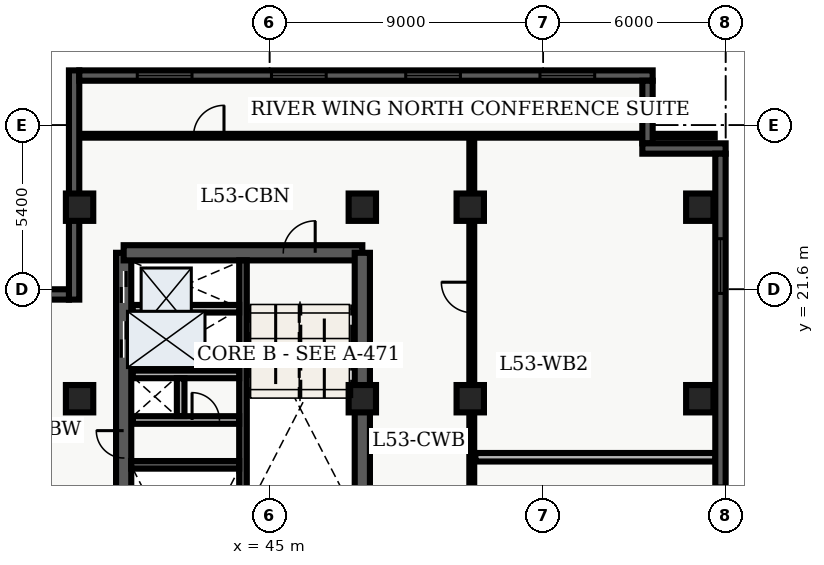
"""IFC4 building model, lengths in metres.
Left out: names, types, materials, properties, quantities, classifications, styles, units other than length and angle.
Written with IfcOpenShell. Run it as: python <this file> out.ifc"""

import sys

from ifc_helpers import new_model, entity, si_unit, converted_unit, direction, frame, origin_with_axes, origin_2d_with_axis, place, context, subcontext, project, spatial, polyline, rectangle, outline, extrude, element, fill, save


model = new_model("IFC4")
c1 = context("Model", 3, precision=1e-05, world=origin_with_axes(), true_north=direction((0.0, 1.0)))
c2 = subcontext(c1, "Body", "Model", "MODEL_VIEW")
j1 = project(units=[si_unit("LENGTHUNIT", "METRE"), converted_unit("PLANEANGLEUNIT", "DEGREE", entity("IfcPlaneAngleMeasure", 0.017), si_unit("PLANEANGLEUNIT", "RADIAN"), dimensions=[0, 0, 0, 0, 0, 0, 0])], contexts=[c1])
p1 = place(None, origin_with_axes())
s1 = spatial("IfcSite", under=j1, at=p1, CompositionType="ELEMENT")
p2 = place(p1, origin_with_axes())
s2 = spatial("IfcBuilding", under=s1, at=p2, CompositionType="ELEMENT")
p3 = place(p2, frame((0.0, 0.0, 216.0), z_axis=(0.0, 0.0, 1.0), x_axis=(1.0, 0.0, 0.0)))
s3 = spatial("IfcBuildingStorey", under=s2, at=p3, CompositionType="ELEMENT", Elevation=216.0)
p4 = place(p3, frame((40.2, 7.2, 0.0), z_axis=(0.0, 0.0, 1.0), x_axis=(0.0, 1.0, 0.0)))
e1 = element("IfcWall", 1, at=p4, inside=s3, PredefinedType="SHEAR", context=c2, shape_type="SweptSolid", body=[
    extrude(outline(polyline([(0.0, -0.25), (15.6, -0.25), (15.6, 0.25), (0.0, 0.25), (0.0, -0.25)])), origin_with_axes(), (0.0, 0.0, 1.0), 3.6),
])
p5 = place(p4, frame((14.475, 0.0, 0.0), z_axis=(0.0, 0.0, 1.0), x_axis=(1.0, 0.0, 0.0)))
e2 = element("IfcOpeningElement", 2, at=p5, cuts=e1, PredefinedType="OPENING", context=c2, shape_type="SweptSolid", body=[
    extrude(rectangle(XDim=1.05, YDim=0.52, at=origin_2d_with_axis()), origin_with_axes(), (0.0, 0.0, 1.0), 2.15),
])
p6 = place(p4, frame((12.75, 0.0, 0.0), z_axis=(0.0, 0.0, 1.0), x_axis=(1.0, 0.0, 0.0)))
e3 = element("IfcOpeningElement", 3, at=p6, cuts=e1, PredefinedType="OPENING", context=c2, shape_type="SweptSolid", body=[
    extrude(rectangle(XDim=1.2, YDim=0.52, at=origin_2d_with_axis()), origin_with_axes(), (0.0, 0.0, 1.0), 2.15),
])
p7 = place(p4, frame((9.3, 0.0, 0.0), z_axis=(0.0, 0.0, 1.0), x_axis=(1.0, 0.0, 0.0)))
e4 = element("IfcOpeningElement", 4, at=p7, cuts=e1, PredefinedType="OPENING", context=c2, shape_type="SweptSolid", body=[
    extrude(rectangle(XDim=0.9, YDim=0.52, at=origin_2d_with_axis()), origin_with_axes(), (0.0, 0.0, 1.0), 2.15),
])
p8 = place(p3, frame((40.2, 22.8, 0.0), z_axis=(0.0, 0.0, 1.0), x_axis=(1.0, 0.0, 0.0)))
e5 = element("IfcWall", 5, at=p8, inside=s3, PredefinedType="SHEAR", context=c2, shape_type="SweptSolid", body=[
    extrude(outline(polyline([(0.0, -0.25), (7.85, -0.25), (7.85, 0.25), (0.0, 0.25), (0.0, -0.25)])), origin_with_axes(), (0.0, 0.0, 1.0), 3.6),
])
p9 = place(p8, frame((5.775, 0.0, 0.0), z_axis=(0.0, 0.0, 1.0), x_axis=(1.0, 0.0, 0.0)))
e6 = element("IfcOpeningElement", 6, at=p9, cuts=e5, PredefinedType="OPENING", context=c2, shape_type="SweptSolid", body=[
    extrude(rectangle(XDim=1.05, YDim=0.52, at=origin_2d_with_axis()), origin_with_axes(), (0.0, 0.0, 1.0), 2.15),
])
p10 = place(p3, frame((48.05, 7.2, 0.0), z_axis=(0.0, 0.0, 1.0), x_axis=(0.0, 1.0, 0.0)))
e7 = element("IfcWall", 7, at=p10, inside=s3, PredefinedType="SHEAR", context=c2, shape_type="SweptSolid", body=[
    extrude(outline(polyline([(0.0, -0.25), (15.6, -0.25), (15.6, 0.25), (0.0, 0.25), (0.0, -0.25)])), origin_with_axes(), (0.0, 0.0, 1.0), 3.6),
])
p11 = place(p10, frame((5.975, 0.0, 0.0), z_axis=(0.0, 0.0, 1.0), x_axis=(1.0, 0.0, 0.0)))
e8 = element("IfcOpeningElement", 8, at=p11, cuts=e7, PredefinedType="OPENING", context=c2, shape_type="SweptSolid", body=[
    extrude(rectangle(XDim=1.05, YDim=0.52, at=origin_2d_with_axis()), origin_with_axes(), (0.0, 0.0, 1.0), 2.15),
])
p12 = place(p10, frame((2.725, 0.0, 0.0), z_axis=(0.0, 0.0, 1.0), x_axis=(1.0, 0.0, 0.0)))
e9 = element("IfcOpeningElement", 9, at=p12, cuts=e7, PredefinedType="OPENING", context=c2, shape_type="SweptSolid", body=[
    extrude(rectangle(XDim=0.95, YDim=0.52, at=origin_2d_with_axis()), origin_with_axes(), (0.0, 0.0, 1.0), 2.15),
])
p13 = place(p3, frame((44.125, 7.45, 0.0), z_axis=(0.0, 0.0, 1.0), x_axis=(0.0, 1.0, 0.0)))
e10 = element("IfcWall", 10, at=p13, inside=s3, PredefinedType="SHEAR", context=c2, shape_type="SweptSolid", body=[
    extrude(outline(polyline([(0.0, -0.125), (15.1, -0.125), (15.1, 0.125), (0.0, 0.125), (0.0, -0.125)])), origin_with_axes(), (0.0, 0.0, 1.0), 3.6),
])
p14 = place(p3, frame((40.45, 15.825, 0.0), z_axis=(0.0, 0.0, 1.0), x_axis=(1.0, 0.0, 0.0)))
e11 = element("IfcWall", 11, at=p14, inside=s3, PredefinedType="SHEAR", context=c2, shape_type="SweptSolid", body=[
    extrude(outline(polyline([(0.0, -0.125), (3.55, -0.125), (3.55, 0.125), (0.0, 0.125), (0.0, -0.125)])), origin_with_axes(), (0.0, 0.0, 1.0), 3.6),
])
p15 = place(p3, frame((40.5, 17.3, 0.0), z_axis=(0.0, 0.0, 1.0), x_axis=(1.0, 0.0, 0.0)))
e12 = element("IfcWall", 12, at=p15, inside=s3, PredefinedType="SOLIDWALL", context=c2, shape_type="SweptSolid", body=[
    extrude(outline(polyline([(0.0, -0.125), (3.5, -0.125), (3.5, 0.125), (0.0, 0.125), (0.0, -0.125)])), origin_with_axes(), (0.0, 0.0, 1.0), 2.64),
])
p16 = place(p15, frame((2.4, 0.0, 0.0), z_axis=(0.0, 0.0, 1.0), x_axis=(1.0, 0.0, 0.0)))
e13 = element("IfcOpeningElement", 13, at=p16, cuts=e12, PredefinedType="OPENING", context=c2, shape_type="SweptSolid", body=[
    extrude(rectangle(XDim=0.9, YDim=0.27, at=origin_2d_with_axis()), origin_with_axes(), (0.0, 0.0, 1.0), 2.15),
])
p17 = place(p3, frame((40.5, 18.8, 0.0), z_axis=(0.0, 0.0, 1.0), x_axis=(1.0, 0.0, 0.0)))
e14 = element("IfcWall", 14, at=p17, inside=s3, PredefinedType="SOLIDWALL", context=c2, shape_type="SweptSolid", body=[
    extrude(outline(polyline([(0.0, -0.125), (3.5, -0.125), (3.5, 0.125), (0.0, 0.125), (0.0, -0.125)])), origin_with_axes(), (0.0, 0.0, 1.0), 2.64),
])
p18 = place(p3, frame((42.075, 17.43, 0.0), z_axis=(0.0, 0.0, 1.0), x_axis=(0.0, 1.0, 0.0)))
e15 = element("IfcWall", 15, at=p18, inside=s3, PredefinedType="SOLIDWALL", context=c2, shape_type="SweptSolid", body=[
    extrude(outline(polyline([(0.0, -0.125), (1.24, -0.125), (1.24, 0.125), (0.0, 0.125), (0.0, -0.125)])), origin_with_axes(), (0.0, 0.0, 1.0), 2.64),
])
for number, where, z_axis, x_axis in (
    (16, (38.75, 18.0, 0.0), (0.0, 0.0, 1.0), (1.0, 0.0, 0.0)),
    (17, (38.75, 24.3, 0.0), (0.0, 0.0, 1.0), (1.0, 0.0, 0.0)),
    (18, (48.05, 18.0, 0.0), (0.0, 0.0, 1.0), (1.0, 0.0, 0.0)),
    (19, (48.05, 24.3, 0.0), (0.0, 0.0, 1.0), (1.0, 0.0, 0.0)),
    (20, (51.6, 18.0, 0.0), (0.0, 0.0, 1.0), (1.0, 0.0, 0.0)),
    (21, (51.6, 24.3, 0.0), (0.0, 0.0, 1.0), (1.0, 0.0, 0.0)),
    (22, (59.15, 18.0, 0.0), (0.0, 0.0, 1.0), (1.0, 0.0, 0.0)),
    (23, (59.15, 24.3, 0.0), (0.0, 0.0, 1.0), (1.0, 0.0, 0.0)),
):
    element("IfcColumn", number, at=place(p3, frame(where, z_axis=z_axis, x_axis=x_axis)), inside=s3, PredefinedType="COLUMN", context=c2, shape_type="SweptSolid", body=[
        extrude(rectangle(XDim=0.9, YDim=0.9, at=origin_2d_with_axis()), origin_with_axes(), (0.0, 0.0, 1.0), 3.9),
    ])
p19 = place(p3, frame((40.5, 20.96, 0.0), z_axis=(0.0, 0.0, 1.0), x_axis=(1.0, 0.0, 0.0)))
e24 = element("IfcWall", 24, at=p19, inside=s3, PredefinedType="SOLIDWALL", context=c2, shape_type="SweptSolid", body=[
    extrude(outline(polyline([(0.0, -0.125), (3.5, -0.125), (3.5, 0.125), (0.0, 0.125), (0.0, -0.125)])), origin_with_axes(), (0.0, 0.0, 1.0), 2.64),
])
p20 = place(p3, frame((51.65, 7.85, 0.0), z_axis=(0.0, 0.0, 1.0), x_axis=(0.0, 1.0, 0.0)))
e25 = element("IfcWall", 25, at=p20, inside=s3, PredefinedType="PARTITIONING", context=c2, shape_type="SweptSolid", body=[
    extrude(outline(polyline([(0.0, -0.08), (18.8, -0.08), (18.8, 0.08), (0.0, 0.08), (0.0, -0.08)])), origin_with_axes(), (0.0, 0.0, 1.0), 2.64),
])
p21 = place(p20, frame((4.143, 0.0, 0.0), z_axis=(0.0, 0.0, 1.0), x_axis=(1.0, 0.0, 0.0)))
e26 = element("IfcOpeningElement", 26, at=p21, cuts=e25, PredefinedType="OPENING", context=c2, shape_type="SweptSolid", body=[
    extrude(rectangle(XDim=1.0, YDim=0.18, at=origin_2d_with_axis()), origin_with_axes(), (0.0, 0.0, 1.0), 2.15),
])
p22 = place(p20, frame((13.482, 0.0, 0.0), z_axis=(0.0, 0.0, 1.0), x_axis=(1.0, 0.0, 0.0)))
e27 = element("IfcOpeningElement", 27, at=p22, cuts=e25, PredefinedType="OPENING", context=c2, shape_type="SweptSolid", body=[
    extrude(rectangle(XDim=1.0, YDim=0.18, at=origin_2d_with_axis()), origin_with_axes(), (0.0, 0.0, 1.0), 2.15),
])
p23 = place(p3, frame((38.735, 26.65, 0.0), z_axis=(0.0, 0.0, 1.0), x_axis=(1.0, 0.0, 0.0)))
e28 = element("IfcWall", 28, at=p23, inside=s3, PredefinedType="PARTITIONING", context=c2, shape_type="SweptSolid", body=[
    extrude(outline(polyline([(0.0, -0.062), (20.905, -0.062), (20.905, 0.062), (0.0, 0.062), (0.0, -0.062)])), origin_with_axes(), (0.0, 0.0, 1.0), 2.64),
])
p24 = place(p23, frame((4.265, 0.0, 0.0), z_axis=(0.0, 0.0, 1.0), x_axis=(1.0, 0.0, 0.0)))
e29 = element("IfcOpeningElement", 29, at=p24, cuts=e28, PredefinedType="OPENING", context=c2, shape_type="SweptSolid", body=[
    extrude(rectangle(XDim=1.0, YDim=0.145, at=origin_2d_with_axis()), origin_with_axes(), (0.0, 0.0, 1.0), 2.15),
])
p25 = place(p3, frame((51.77, 16.075, 0.0), z_axis=(0.0, 0.0, 1.0), x_axis=(1.0, 0.0, 0.0)))
e30 = element("IfcWall", 30, at=p25, inside=s3, PredefinedType="PARTITIONING", context=c2, shape_type="SweptSolid", body=[
    extrude(outline(polyline([(0.0, -0.14), (7.895, -0.14), (7.895, 0.14), (0.0, 0.14), (0.0, -0.14)])), origin_with_axes(), (0.0, 0.0, 1.0), 2.64),
])
p26 = place(p3, frame((38.57, 21.26, 0.0), z_axis=(0.0, 0.0, 1.0), x_axis=(0.0, 1.0, 0.0)))
e31 = element("IfcWall", 31, at=p26, inside=s3, PredefinedType="SOLIDWALL", context=c2, shape_type="SweptSolid", body=[
    extrude(outline(polyline([(0.0, -0.17), (7.54, -0.17), (7.54, 0.17), (0.0, 0.17), (0.0, -0.17)])), origin_with_axes(), (0.0, 0.0, 1.0), 3.6),
])
p27 = place(p3, frame((38.74, 28.63, 0.0), z_axis=(0.0, 0.0, 1.0), x_axis=(1.0, 0.0, 0.0)))
e32 = element("IfcWall", 32, at=p27, inside=s3, PredefinedType="SOLIDWALL", context=c2, shape_type="SweptSolid", body=[
    extrude(outline(polyline([(0.0, -0.17), (18.86, -0.17), (18.86, 0.17), (0.0, 0.17), (0.0, -0.17)])), origin_with_axes(), (0.0, 0.0, 1.0), 3.6),
])
p28 = place(p27, frame((2.808, 0.0, 0.45), z_axis=(0.0, 0.0, 1.0), x_axis=(1.0, 0.0, 0.0)))
e33 = element("IfcOpeningElement", 33, at=p28, cuts=e32, PredefinedType="OPENING", context=c2, shape_type="SweptSolid", body=[
    extrude(rectangle(XDim=1.8, YDim=0.36, at=origin_2d_with_axis()), origin_with_axes(), (0.0, 0.0, 1.0), 2.1),
])
p29 = place(p27, frame((7.222, 0.0, 0.45), z_axis=(0.0, 0.0, 1.0), x_axis=(1.0, 0.0, 0.0)))
e34 = element("IfcOpeningElement", 34, at=p29, cuts=e32, PredefinedType="OPENING", context=c2, shape_type="SweptSolid", body=[
    extrude(rectangle(XDim=1.8, YDim=0.36, at=origin_2d_with_axis()), origin_with_axes(), (0.0, 0.0, 1.0), 2.1),
])
p30 = place(p27, frame((11.637, 0.0, 0.45), z_axis=(0.0, 0.0, 1.0), x_axis=(1.0, 0.0, 0.0)))
e35 = element("IfcOpeningElement", 35, at=p30, cuts=e32, PredefinedType="OPENING", context=c2, shape_type="SweptSolid", body=[
    extrude(rectangle(XDim=1.8, YDim=0.36, at=origin_2d_with_axis()), origin_with_axes(), (0.0, 0.0, 1.0), 2.1),
])
p31 = place(p27, frame((16.053, 0.0, 0.45), z_axis=(0.0, 0.0, 1.0), x_axis=(1.0, 0.0, 0.0)))
e36 = element("IfcOpeningElement", 36, at=p31, cuts=e32, PredefinedType="OPENING", context=c2, shape_type="SweptSolid", body=[
    extrude(rectangle(XDim=1.8, YDim=0.36, at=origin_2d_with_axis()), origin_with_axes(), (0.0, 0.0, 1.0), 2.1),
])
p32 = place(p3, frame((57.43, 28.46, 0.0), z_axis=(0.0, 0.0, 1.0), x_axis=(0.0, -1.0, 0.0)))
e37 = element("IfcWall", 37, at=p32, inside=s3, PredefinedType="SOLIDWALL", context=c2, shape_type="SweptSolid", body=[
    extrude(outline(polyline([(0.0, -0.17), (2.06, -0.17), (2.06, 0.17), (0.0, 0.17), (0.0, -0.17)])), origin_with_axes(), (0.0, 0.0, 1.0), 3.6),
])
p33 = place(p3, frame((57.26, 26.23, 0.0), z_axis=(0.0, 0.0, 1.0), x_axis=(1.0, 0.0, 0.0)))
e38 = element("IfcWall", 38, at=p33, inside=s3, PredefinedType="SOLIDWALL", context=c2, shape_type="SweptSolid", body=[
    extrude(outline(polyline([(0.0, -0.17), (2.74, -0.17), (2.74, 0.17), (0.0, 0.17), (0.0, -0.17)])), origin_with_axes(), (0.0, 0.0, 1.0), 3.6),
])
p34 = place(p3, frame((59.83, 26.06, 0.0), z_axis=(0.0, 0.0, 1.0), x_axis=(0.0, -1.0, 0.0)))
e39 = element("IfcWall", 39, at=p34, inside=s3, PredefinedType="SOLIDWALL", context=c2, shape_type="SweptSolid", body=[
    extrude(outline(polyline([(0.0, -0.17), (23.66, -0.17), (23.66, 0.17), (0.0, 0.17), (0.0, -0.17)])), origin_with_axes(), (0.0, 0.0, 1.0), 3.6),
])
p35 = place(p34, frame((3.696, 0.0, 0.45), z_axis=(0.0, 0.0, 1.0), x_axis=(1.0, 0.0, 0.0)))
e40 = element("IfcOpeningElement", 40, at=p35, cuts=e39, PredefinedType="OPENING", context=c2, shape_type="SweptSolid", body=[
    extrude(rectangle(XDim=1.8, YDim=0.36, at=origin_2d_with_axis()), origin_with_axes(), (0.0, 0.0, 1.0), 2.1),
])
p36 = place(p34, frame((11.83, 0.0, 0.45), z_axis=(0.0, 0.0, 1.0), x_axis=(1.0, 0.0, 0.0)))
e41 = element("IfcOpeningElement", 41, at=p36, cuts=e39, PredefinedType="OPENING", context=c2, shape_type="SweptSolid", body=[
    extrude(rectangle(XDim=1.8, YDim=0.36, at=origin_2d_with_axis()), origin_with_axes(), (0.0, 0.0, 1.0), 2.1),
])
p37 = place(p34, frame((20.364, 0.0, 0.45), z_axis=(0.0, 0.0, 1.0), x_axis=(1.0, 0.0, 0.0)))
e42 = element("IfcOpeningElement", 42, at=p37, cuts=e39, PredefinedType="OPENING", context=c2, shape_type="SweptSolid", body=[
    extrude(rectangle(XDim=1.8, YDim=0.36, at=origin_2d_with_axis()), origin_with_axes(), (0.0, 0.0, 1.0), 2.1),
])
p38 = place(p3, frame((32.06, 21.43, 0.0), z_axis=(0.0, 0.0, 1.0), x_axis=(1.0, 0.0, 0.0)))
e43 = element("IfcWall", 43, at=p38, inside=s3, PredefinedType="SOLIDWALL", context=c2, shape_type="SweptSolid", body=[
    extrude(outline(polyline([(0.0, -0.17), (6.34, -0.17), (6.34, 0.17), (0.0, 0.17), (0.0, -0.17)])), origin_with_axes(), (0.0, 0.0, 1.0), 3.6),
])
p39 = place(p38, frame((2.72, 0.0, 0.45), z_axis=(0.0, 0.0, 1.0), x_axis=(1.0, 0.0, 0.0)))
e44 = element("IfcOpeningElement", 44, at=p39, cuts=e43, PredefinedType="OPENING", context=c2, shape_type="SweptSolid", body=[
    extrude(rectangle(XDim=1.8, YDim=0.36, at=origin_2d_with_axis()), origin_with_axes(), (0.0, 0.0, 1.0), 2.1),
])
p40 = place(p4, frame((14.475, 0.0, 0.0), z_axis=(0.0, 0.0, 1.0), x_axis=(1.0, 0.0, 0.0)))
e45 = element("IfcDoor", 45, at=p40, inside=s3, OperationType="SLIDING_TO_RIGHT", PredefinedType="DOOR", context=c2, shape_type="SweptSolid", body=[
    extrude(rectangle(XDim=1.05, YDim=0.09, at=origin_2d_with_axis()), origin_with_axes(), (0.0, 0.0, 1.0), 2.15),
])
fill(e2, e45)
p41 = place(p4, frame((12.75, 0.0, 0.0), z_axis=(0.0, 0.0, 1.0), x_axis=(1.0, 0.0, 0.0)))
e46 = element("IfcDoor", 46, at=p41, inside=s3, OperationType="DOUBLE_DOOR_SLIDING", PredefinedType="DOOR", context=c2, shape_type="SweptSolid", body=[
    extrude(rectangle(XDim=1.2, YDim=0.09, at=origin_2d_with_axis()), origin_with_axes(), (0.0, 0.0, 1.0), 2.15),
])
fill(e3, e46)
p42 = place(p4, frame((9.3, 0.0, 0.0), z_axis=(0.0, 0.0, 1.0), x_axis=(1.0, 0.0, 0.0)))
e47 = element("IfcDoor", 47, at=p42, inside=s3, OperationType="SINGLE_SWING_RIGHT", PredefinedType="DOOR", context=c2, shape_type="SweptSolid", body=[
    extrude(rectangle(XDim=0.9, YDim=0.09, at=origin_2d_with_axis()), origin_with_axes(), (0.0, 0.0, 1.0), 2.15),
])
fill(e4, e47)
p43 = place(p15, frame((2.4, 0.0, 0.0), z_axis=(0.0, 0.0, 1.0), x_axis=(1.0, 0.0, 0.0)))
e48 = element("IfcDoor", 48, at=p43, inside=s3, OperationType="SINGLE_SWING_LEFT", PredefinedType="DOOR", context=c2, shape_type="SweptSolid", body=[
    extrude(rectangle(XDim=0.9, YDim=0.09, at=origin_2d_with_axis()), origin_with_axes(), (0.0, 0.0, 1.0), 2.15),
])
fill(e13, e48)
p44 = place(p8, frame((5.775, 0.0, 0.0), z_axis=(0.0, 0.0, 1.0), x_axis=(1.0, 0.0, 0.0)))
e49 = element("IfcDoor", 49, at=p44, inside=s3, OperationType="SINGLE_SWING_RIGHT", PredefinedType="DOOR", context=c2, shape_type="SweptSolid", body=[
    extrude(rectangle(XDim=1.05, YDim=0.09, at=origin_2d_with_axis()), origin_with_axes(), (0.0, 0.0, 1.0), 2.15),
])
fill(e6, e49)
p45 = place(p23, frame((4.265, 0.0, 0.0), z_axis=(0.0, 0.0, 1.0), x_axis=(1.0, 0.0, 0.0)))
e50 = element("IfcDoor", 50, at=p45, inside=s3, OperationType="SINGLE_SWING_RIGHT", PredefinedType="DOOR", context=c2, shape_type="SweptSolid", body=[
    extrude(rectangle(XDim=1.0, YDim=0.075, at=origin_2d_with_axis()), origin_with_axes(), (0.0, 0.0, 1.0), 2.15),
])
fill(e29, e50)
p46 = place(p20, frame((13.482, 0.0, 0.0), z_axis=(0.0, 0.0, 1.0), x_axis=(1.0, 0.0, 0.0)))
e51 = element("IfcDoor", 51, at=p46, inside=s3, OperationType="SINGLE_SWING_RIGHT", PredefinedType="DOOR", context=c2, shape_type="SweptSolid", body=[
    extrude(rectangle(XDim=1.0, YDim=0.09, at=origin_2d_with_axis()), origin_with_axes(), (0.0, 0.0, 1.0), 2.15),
])
fill(e27, e51)
p47 = place(p27, frame((2.808, 0.0, 0.45), z_axis=(0.0, 0.0, 1.0), x_axis=(1.0, 0.0, 0.0)))
e52 = element("IfcWindow", 52, at=p47, inside=s3, PredefinedType="WINDOW", context=c2, shape_type="SweptSolid", body=[
    extrude(rectangle(XDim=1.8, YDim=0.09, at=origin_2d_with_axis()), origin_with_axes(), (0.0, 0.0, 1.0), 2.1),
])
fill(e33, e52)
p48 = place(p27, frame((7.222, 0.0, 0.45), z_axis=(0.0, 0.0, 1.0), x_axis=(1.0, 0.0, 0.0)))
e53 = element("IfcWindow", 53, at=p48, inside=s3, PredefinedType="WINDOW", context=c2, shape_type="SweptSolid", body=[
    extrude(rectangle(XDim=1.8, YDim=0.09, at=origin_2d_with_axis()), origin_with_axes(), (0.0, 0.0, 1.0), 2.1),
])
fill(e34, e53)
p49 = place(p27, frame((11.637, 0.0, 0.45), z_axis=(0.0, 0.0, 1.0), x_axis=(1.0, 0.0, 0.0)))
e54 = element("IfcWindow", 54, at=p49, inside=s3, PredefinedType="WINDOW", context=c2, shape_type="SweptSolid", body=[
    extrude(rectangle(XDim=1.8, YDim=0.09, at=origin_2d_with_axis()), origin_with_axes(), (0.0, 0.0, 1.0), 2.1),
])
fill(e35, e54)
p50 = place(p27, frame((16.053, 0.0, 0.45), z_axis=(0.0, 0.0, 1.0), x_axis=(1.0, 0.0, 0.0)))
e55 = element("IfcWindow", 55, at=p50, inside=s3, PredefinedType="WINDOW", context=c2, shape_type="SweptSolid", body=[
    extrude(rectangle(XDim=1.8, YDim=0.09, at=origin_2d_with_axis()), origin_with_axes(), (0.0, 0.0, 1.0), 2.1),
])
fill(e36, e55)
p51 = place(p34, frame((3.696, 0.0, 0.45), z_axis=(0.0, 0.0, 1.0), x_axis=(1.0, 0.0, 0.0)))
e56 = element("IfcWindow", 56, at=p51, inside=s3, PredefinedType="WINDOW", context=c2, shape_type="SweptSolid", body=[
    extrude(rectangle(XDim=1.8, YDim=0.09, at=origin_2d_with_axis()), origin_with_axes(), (0.0, 0.0, 1.0), 2.1),
])
fill(e40, e56)
save(model, sys.argv[1])
